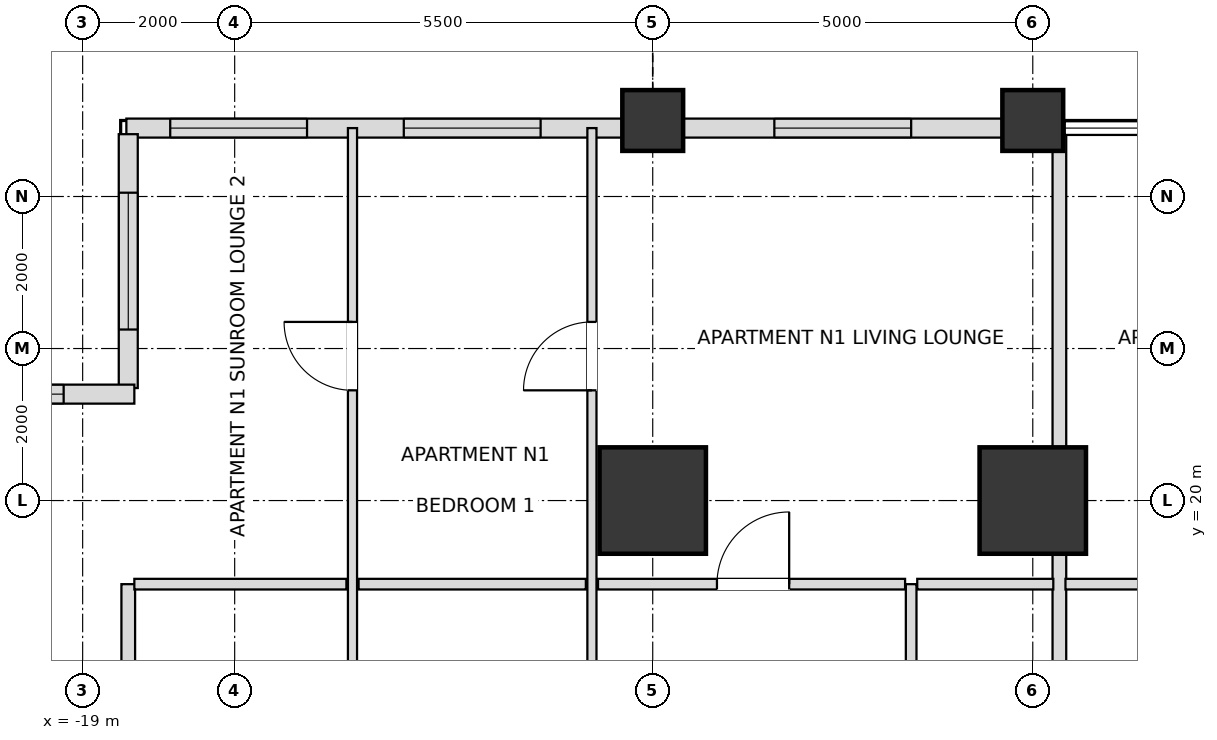
"""IFC4 building model, lengths in metres.
Left out: names, types, materials, properties, quantities, classifications, styles, units other than length and angle.
Written with IfcOpenShell. Run it as: python <this file> out.ifc"""

import sys

from ifc_helpers import new_model, si_unit, direction, frame, frame_2d, origin, origin_2d, place, context, subcontext, project, spatial, rectangle, extrude, element, fill, save


model = new_model("IFC4")
c1 = context("Model", 3, precision=1e-05, world=origin(), true_north=direction((0.0, 1.0)))
c2 = subcontext(c1, "Body", "Model", "MODEL_VIEW")
j1 = project(units=[si_unit("LENGTHUNIT", "METRE"), si_unit("PLANEANGLEUNIT", "RADIAN")], contexts=[c1])
p1 = place(None, origin())
s1 = spatial("IfcSite", under=j1, at=p1, CompositionType="ELEMENT")
p2 = place(p1, origin())
s2 = spatial("IfcBuilding", under=s1, at=p2, CompositionType="ELEMENT")
p3 = place(p2, frame((0.0, 0.0, 39.6)))
s3 = spatial("IfcBuildingStorey", under=s2, at=p3, CompositionType="ELEMENT", Elevation=39.6)
for number, where, z_axis, x_axis in (
    (1, (-6.5, 20.0, 0.0), (0.0, 0.0, 1.0), (1.0, 0.0, 0.0)),
    (2, (-11.5, 20.0, 0.0), (0.0, 0.0, 1.0), (1.0, 0.0, 0.0)),
):
    element("IfcColumn", number, at=place(p3, frame(where, z_axis=z_axis, x_axis=x_axis)), inside=s3, PredefinedType="USERDEFINED", context=c2, shape_type="SweptSolid", body=[
        extrude(rectangle(XDim=1.4, YDim=1.4, at=origin_2d()), origin(), (0.0, 0.0, 1.0), 3.6),
    ])
for number, where, z_axis, x_axis in (
    (3, (-11.5, 25.0, 0.0), (0.0, 0.0, 1.0), (1.0, 0.0, 0.0)),
    (4, (-6.5, 25.0, 0.0), (0.0, 0.0, 1.0), (1.0, 0.0, 0.0)),
):
    element("IfcColumn", number, at=place(p3, frame(where, z_axis=z_axis, x_axis=x_axis)), inside=s3, PredefinedType="COLUMN", context=c2, shape_type="SweptSolid", body=[
        extrude(rectangle(XDim=0.8, YDim=0.8, at=origin_2d()), origin(), (0.0, 0.0, 1.0), 3.6),
    ])
p4 = place(p3, frame((-6.895, 24.9, 0.0), z_axis=(0.0, 0.0, 1.0), x_axis=(-1.0, 0.0, 0.0)))
e5 = element("IfcWall", 5, at=p4, inside=s3, PredefinedType="SOLIDWALL", context=c2, shape_type="SweptSolid", body=[
    extrude(rectangle(XDim=4.21, YDim=0.25, at=frame_2d((2.105, 0.0))), origin(), (0.0, 0.0, 1.0), 2.736),
])
p5 = place(p4, frame((1.205, 0.0, 0.72)))
e6 = element("IfcOpeningElement", 6, at=p5, cuts=e5, PredefinedType="OPENING", context=c2, shape_type="SweptSolid", body=[
    extrude(rectangle(XDim=1.8, YDim=1.68, at=frame_2d((0.9, 0.84))), frame((0.0, 0.135, 0.0), z_axis=(0.0, -1.0, 0.0), x_axis=(1.0, 0.0, 0.0)), (0.0, 0.0, 1.0), 0.27),
])
p6 = place(p3, frame((-11.895, 24.9, 0.0), z_axis=(0.0, 0.0, 1.0), x_axis=(-1.0, 0.0, 0.0)))
e7 = element("IfcWall", 7, at=p6, inside=s3, PredefinedType="SOLIDWALL", context=c2, shape_type="SweptSolid", body=[
    extrude(rectangle(XDim=6.53, YDim=0.25, at=frame_2d((3.265, 0.0))), origin(), (0.0, 0.0, 1.0), 2.736),
])
p7 = place(p6, frame((1.08, 0.0, 0.72)))
e8 = element("IfcOpeningElement", 8, at=p7, cuts=e7, PredefinedType="OPENING", context=c2, shape_type="SweptSolid", body=[
    extrude(rectangle(XDim=1.8, YDim=1.68, at=frame_2d((0.9, 0.84))), frame((0.0, 0.135, 0.0), z_axis=(0.0, -1.0, 0.0), x_axis=(1.0, 0.0, 0.0)), (0.0, 0.0, 1.0), 0.27),
])
p8 = place(p6, frame((4.153, 0.0, 0.72)))
e9 = element("IfcOpeningElement", 9, at=p8, cuts=e7, PredefinedType="OPENING", context=c2, shape_type="SweptSolid", body=[
    extrude(rectangle(XDim=1.8, YDim=1.68, at=frame_2d((0.9, 0.84))), frame((0.0, 0.135, 0.0), z_axis=(0.0, -1.0, 0.0), x_axis=(1.0, 0.0, 0.0)), (0.0, 0.0, 1.0), 0.27),
])
p9 = place(p3, frame((-18.4, 24.82, 0.0), z_axis=(0.0, 0.0, 1.0), x_axis=(0.0, -1.0, 0.0)))
e10 = element("IfcWall", 10, at=p9, inside=s3, PredefinedType="SOLIDWALL", context=c2, shape_type="SweptSolid", body=[
    extrude(rectangle(XDim=3.34, YDim=0.25, at=frame_2d((1.67, 0.0))), origin(), (0.0, 0.0, 1.0), 2.736),
])
p10 = place(p9, frame((0.77, 0.0, 0.72)))
e11 = element("IfcOpeningElement", 11, at=p10, cuts=e10, PredefinedType="OPENING", context=c2, shape_type="SweptSolid", body=[
    extrude(rectangle(XDim=1.8, YDim=1.68, at=frame_2d((0.9, 0.84))), frame((0.0, 0.135, 0.0), z_axis=(0.0, -1.0, 0.0), x_axis=(1.0, 0.0, 0.0)), (0.0, 0.0, 1.0), 0.27),
])
p11 = place(p3, frame((-18.32, 21.4, 0.0), z_axis=(0.0, 0.0, 1.0), x_axis=(-1.0, 0.0, 0.0)))
e12 = element("IfcWall", 12, at=p11, inside=s3, PredefinedType="SOLIDWALL", context=c2, shape_type="SweptSolid", body=[
    extrude(rectangle(XDim=3.66, YDim=0.25, at=frame_2d((1.83, 0.0))), origin(), (0.0, 0.0, 1.0), 2.736),
])
p12 = place(p11, frame((0.93, 0.0, 0.72)))
e13 = element("IfcOpeningElement", 13, at=p12, cuts=e12, PredefinedType="OPENING", context=c2, shape_type="SweptSolid", body=[
    extrude(rectangle(XDim=1.8, YDim=1.68, at=frame_2d((0.9, 0.84))), frame((0.0, 0.135, 0.0), z_axis=(0.0, -1.0, 0.0), x_axis=(1.0, 0.0, 0.0)), (0.0, 0.0, 1.0), 0.27),
])
p13 = place(p3, frame((-18.4, 9.3, 0.0), z_axis=(0.0, 0.0, 1.0), x_axis=(0.0, 1.0, 0.0)))
e14 = element("IfcWall", 14, at=p13, inside=s3, PredefinedType="PARTITIONING", context=c2, shape_type="SweptSolid", body=[
    extrude(rectangle(XDim=9.6, YDim=0.18, at=frame_2d((4.8, 0.0))), origin(), (0.0, 0.0, 1.0), 2.736),
])
p14 = place(p3, frame((-15.45, 9.3, 0.0), z_axis=(0.0, 0.0, 1.0), x_axis=(0.0, 1.0, 0.0)))
e15 = element("IfcWall", 15, at=p14, inside=s3, PredefinedType="PARTITIONING", context=c2, shape_type="SweptSolid", body=[
    extrude(rectangle(XDim=15.6, YDim=0.12, at=frame_2d((7.8, 0.0))), origin(), (0.0, 0.0, 1.0), 2.736),
])
p15 = place(p14, frame((4.478, 0.0, 0.0)))
e16 = element("IfcOpeningElement", 16, at=p15, cuts=e15, PredefinedType="OPENING", context=c2, shape_type="SweptSolid", body=[
    extrude(rectangle(XDim=0.9, YDim=2.1, at=frame_2d((0.45, 1.05))), frame((0.0, 0.07, 0.0), z_axis=(0.0, -1.0, 0.0), x_axis=(1.0, 0.0, 0.0)), (0.0, 0.0, 1.0), 0.14),
])
p16 = place(p14, frame((12.15, 0.0, 0.0)))
e17 = element("IfcOpeningElement", 17, at=p16, cuts=e15, PredefinedType="OPENING", context=c2, shape_type="SweptSolid", body=[
    extrude(rectangle(XDim=0.9, YDim=2.1, at=frame_2d((0.45, 1.05))), frame((0.0, 0.07, 0.0), z_axis=(0.0, -1.0, 0.0), x_axis=(1.0, 0.0, 0.0)), (0.0, 0.0, 1.0), 0.14),
])
p17 = place(p3, frame((-12.3, 9.3, 0.0), z_axis=(0.0, 0.0, 1.0), x_axis=(0.0, 1.0, 0.0)))
e18 = element("IfcWall", 18, at=p17, inside=s3, PredefinedType="PARTITIONING", context=c2, shape_type="SweptSolid", body=[
    extrude(rectangle(XDim=15.6, YDim=0.12, at=frame_2d((7.8, 0.0))), origin(), (0.0, 0.0, 1.0), 2.736),
])
p18 = place(p17, frame((4.325, 0.0, 0.0)))
e19 = element("IfcOpeningElement", 19, at=p18, cuts=e18, PredefinedType="OPENING", context=c2, shape_type="SweptSolid", body=[
    extrude(rectangle(XDim=0.95, YDim=2.1, at=frame_2d((0.475, 1.05))), frame((0.0, 0.07, 0.0), z_axis=(0.0, -1.0, 0.0), x_axis=(1.0, 0.0, 0.0)), (0.0, 0.0, 1.0), 0.14),
])
p19 = place(p17, frame((12.15, 0.0, 0.0)))
e20 = element("IfcOpeningElement", 20, at=p19, cuts=e18, PredefinedType="OPENING", context=c2, shape_type="SweptSolid", body=[
    extrude(rectangle(XDim=0.9, YDim=2.1, at=frame_2d((0.45, 1.05))), frame((0.0, 0.07, 0.0), z_axis=(0.0, -1.0, 0.0), x_axis=(1.0, 0.0, 0.0)), (0.0, 0.0, 1.0), 0.14),
])
p20 = place(p3, frame((-8.1, 9.3, 0.0), z_axis=(0.0, 0.0, 1.0), x_axis=(0.0, 1.0, 0.0)))
e21 = element("IfcWall", 21, at=p20, inside=s3, PredefinedType="PARTITIONING", context=c2, shape_type="SweptSolid", body=[
    extrude(rectangle(XDim=9.6, YDim=0.14, at=frame_2d((4.8, 0.0))), origin(), (0.0, 0.0, 1.0), 2.816),
])
p21 = place(p20, frame((4.35, 0.0, 0.0)))
e22 = element("IfcOpeningElement", 22, at=p21, cuts=e21, PredefinedType="OPENING", context=c2, shape_type="SweptSolid", body=[
    extrude(rectangle(XDim=0.9, YDim=2.1, at=frame_2d((0.45, 1.05))), frame((0.0, 0.08, 0.0), z_axis=(0.0, -1.0, 0.0), x_axis=(1.0, 0.0, 0.0)), (0.0, 0.0, 1.0), 0.16),
])
p22 = place(p3, frame((-6.15, 9.3, 0.0), z_axis=(0.0, 0.0, 1.0), x_axis=(0.0, 1.0, 0.0)))
e23 = element("IfcWall", 23, at=p22, inside=s3, PredefinedType="PARTITIONING", context=c2, shape_type="SweptSolid", body=[
    extrude(rectangle(XDim=15.6, YDim=0.18, at=frame_2d((7.8, 0.0))), origin(), (0.0, 0.0, 1.0), 2.816),
])
p23 = place(p3, frame((-18.32, 18.9, 0.0), z_axis=(0.0, 0.0, 1.0), x_axis=(1.0, 0.0, 0.0)))
e24 = element("IfcWall", 24, at=p23, inside=s3, PredefinedType="PARTITIONING", context=c2, shape_type="SweptSolid", body=[
    extrude(rectangle(XDim=2.79, YDim=0.14, at=frame_2d((1.395, 0.0))), origin(), (0.0, 0.0, 1.0), 2.736),
])
p24 = place(p3, frame((-15.37, 18.9, 0.0), z_axis=(0.0, 0.0, 1.0), x_axis=(1.0, 0.0, 0.0)))
e25 = element("IfcWall", 25, at=p24, inside=s3, PredefinedType="PARTITIONING", context=c2, shape_type="SweptSolid", body=[
    extrude(rectangle(XDim=2.99, YDim=0.14, at=frame_2d((1.495, 0.0))), origin(), (0.0, 0.0, 1.0), 2.736),
])
p25 = place(p3, frame((-12.22, 18.9, 0.0), z_axis=(0.0, 0.0, 1.0), x_axis=(1.0, 0.0, 0.0)))
e26 = element("IfcWall", 26, at=p25, inside=s3, PredefinedType="PARTITIONING", context=c2, shape_type="SweptSolid", body=[
    extrude(rectangle(XDim=4.04, YDim=0.14, at=frame_2d((2.02, 0.0))), origin(), (0.0, 0.0, 1.0), 2.736),
])
p26 = place(p25, frame((1.565, 0.0, 0.0)))
e27 = element("IfcOpeningElement", 27, at=p26, cuts=e26, PredefinedType="OPENING", context=c2, shape_type="SweptSolid", body=[
    extrude(rectangle(XDim=0.95, YDim=2.1, at=frame_2d((0.475, 1.05))), frame((0.0, 0.08, 0.0), z_axis=(0.0, -1.0, 0.0), x_axis=(1.0, 0.0, 0.0)), (0.0, 0.0, 1.0), 0.16),
])
p27 = place(p3, frame((-8.02, 18.9, 0.0), z_axis=(0.0, 0.0, 1.0), x_axis=(1.0, 0.0, 0.0)))
e28 = element("IfcWall", 28, at=p27, inside=s3, PredefinedType="PARTITIONING", context=c2, shape_type="SweptSolid", body=[
    extrude(rectangle(XDim=1.79, YDim=0.14, at=frame_2d((0.895, 0.0))), origin(), (0.0, 0.0, 1.0), 2.816),
])
p28 = place(p3, frame((-6.07, 18.9, 0.0), z_axis=(0.0, 0.0, 1.0), x_axis=(1.0, 0.0, 0.0)))
e29 = element("IfcWall", 29, at=p28, inside=s3, PredefinedType="PARTITIONING", context=c2, shape_type="SweptSolid", body=[
    extrude(rectangle(XDim=1.79, YDim=0.14, at=frame_2d((0.895, 0.0))), origin(), (0.0, 0.0, 1.0), 3.38),
])
p29 = place(p5, origin())
e30 = element("IfcWindow", 30, at=p29, inside=s3, PartitioningType="SINGLE_PANEL", PredefinedType="WINDOW", context=c2, shape_type="SweptSolid", body=[
    extrude(rectangle(XDim=1.8, YDim=1.68, at=frame_2d((0.9, 0.84))), frame((0.0, 0.03, 0.0), z_axis=(0.0, -1.0, 0.0), x_axis=(1.0, 0.0, 0.0)), (0.0, 0.0, 1.0), 0.06),
])
fill(e6, e30)
p30 = place(p7, origin())
e31 = element("IfcWindow", 31, at=p30, inside=s3, PartitioningType="SINGLE_PANEL", PredefinedType="WINDOW", context=c2, shape_type="SweptSolid", body=[
    extrude(rectangle(XDim=1.8, YDim=1.68, at=frame_2d((0.9, 0.84))), frame((0.0, 0.03, 0.0), z_axis=(0.0, -1.0, 0.0), x_axis=(1.0, 0.0, 0.0)), (0.0, 0.0, 1.0), 0.06),
])
fill(e8, e31)
p31 = place(p8, origin())
e32 = element("IfcWindow", 32, at=p31, inside=s3, PartitioningType="SINGLE_PANEL", PredefinedType="WINDOW", context=c2, shape_type="SweptSolid", body=[
    extrude(rectangle(XDim=1.8, YDim=1.68, at=frame_2d((0.9, 0.84))), frame((0.0, 0.03, 0.0), z_axis=(0.0, -1.0, 0.0), x_axis=(1.0, 0.0, 0.0)), (0.0, 0.0, 1.0), 0.06),
])
fill(e9, e32)
p32 = place(p10, origin())
e33 = element("IfcWindow", 33, at=p32, inside=s3, PartitioningType="SINGLE_PANEL", PredefinedType="WINDOW", context=c2, shape_type="SweptSolid", body=[
    extrude(rectangle(XDim=1.8, YDim=1.68, at=frame_2d((0.9, 0.84))), frame((0.0, 0.03, 0.0), z_axis=(0.0, -1.0, 0.0), x_axis=(1.0, 0.0, 0.0)), (0.0, 0.0, 1.0), 0.06),
])
fill(e11, e33)
p33 = place(p12, origin())
e34 = element("IfcWindow", 34, at=p33, inside=s3, PartitioningType="SINGLE_PANEL", PredefinedType="WINDOW", context=c2, shape_type="SweptSolid", body=[
    extrude(rectangle(XDim=1.8, YDim=1.68, at=frame_2d((0.9, 0.84))), frame((0.0, 0.03, 0.0), z_axis=(0.0, -1.0, 0.0), x_axis=(1.0, 0.0, 0.0)), (0.0, 0.0, 1.0), 0.06),
])
fill(e13, e34)
p34 = place(p26, origin())
e35 = element("IfcDoor", 35, at=p34, inside=s3, OperationType="SINGLE_SWING_RIGHT", PredefinedType="DOOR", context=c2, shape_type="SweptSolid", body=[
    extrude(rectangle(XDim=0.95, YDim=2.1, at=frame_2d((0.475, 1.05))), frame((0.0, 0.025, 0.0), z_axis=(0.0, -1.0, 0.0), x_axis=(1.0, 0.0, 0.0)), (0.0, 0.0, 1.0), 0.05),
])
fill(e27, e35)
p35 = place(p19, origin())
e36 = element("IfcDoor", 36, at=p35, inside=s3, OperationType="SINGLE_SWING_LEFT", PredefinedType="DOOR", context=c2, shape_type="SweptSolid", body=[
    extrude(rectangle(XDim=0.9, YDim=2.1, at=frame_2d((0.45, 1.05))), frame((0.0, 0.025, 0.0), z_axis=(0.0, -1.0, 0.0), x_axis=(1.0, 0.0, 0.0)), (0.0, 0.0, 1.0), 0.05),
])
fill(e20, e36)
p36 = place(p16, origin())
e37 = element("IfcDoor", 37, at=p36, inside=s3, OperationType="SINGLE_SWING_RIGHT", PredefinedType="DOOR", context=c2, shape_type="SweptSolid", body=[
    extrude(rectangle(XDim=0.9, YDim=2.1, at=frame_2d((0.45, 1.05))), frame((0.0, 0.025, 0.0), z_axis=(0.0, -1.0, 0.0), x_axis=(1.0, 0.0, 0.0)), (0.0, 0.0, 1.0), 0.05),
])
fill(e17, e37)
save(model, sys.argv[1])
